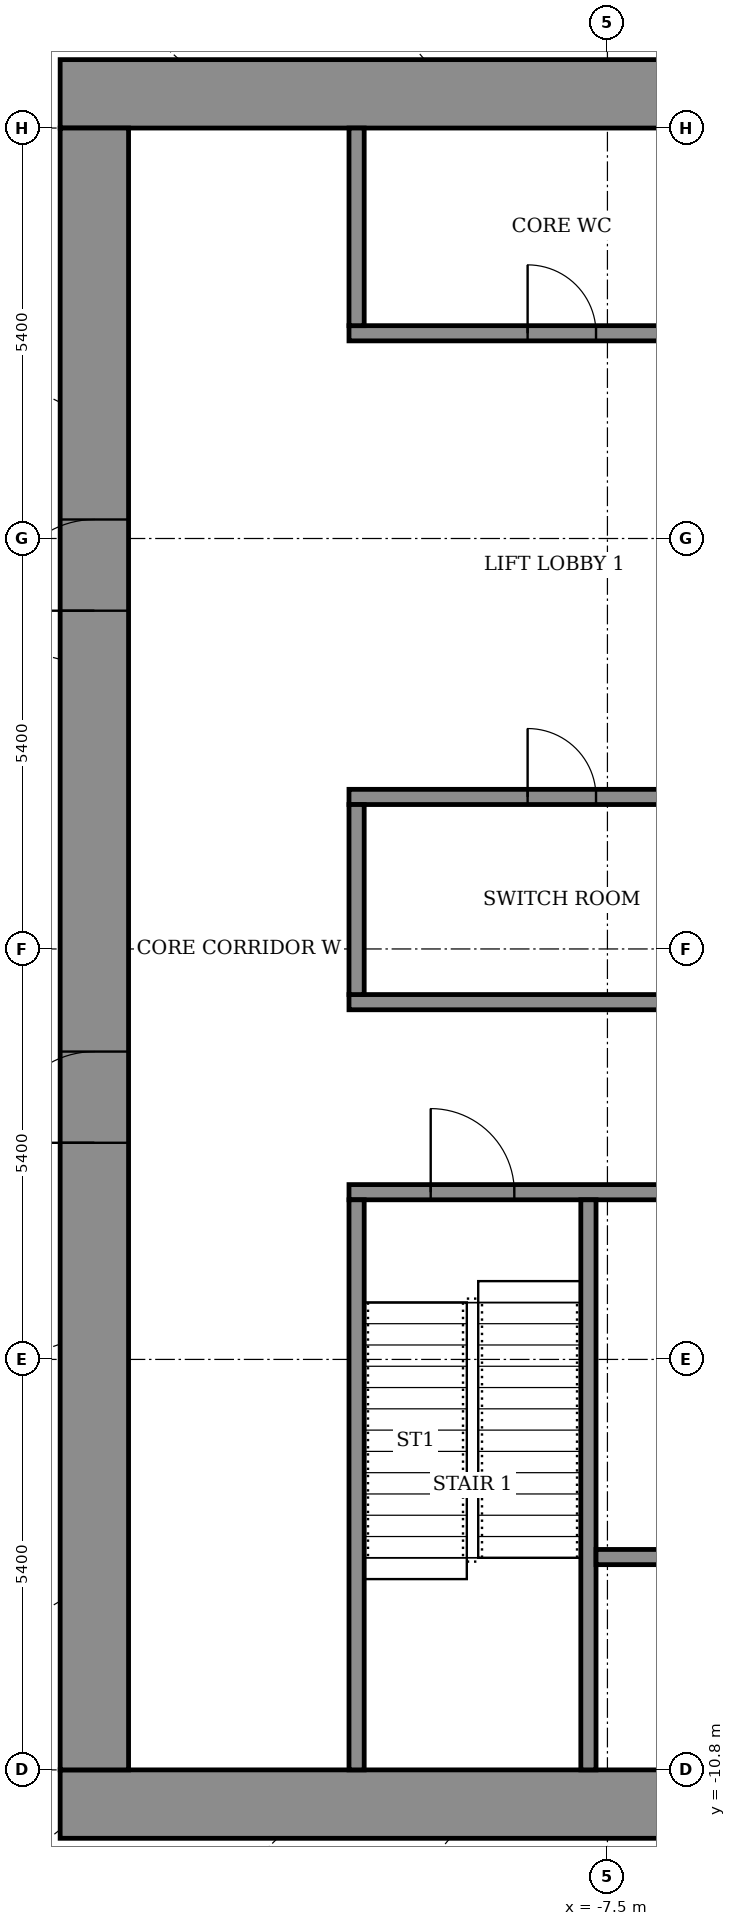
"""IFC4 building model, lengths in metres.
Left out: names, types, materials, properties, quantities, classifications, styles, units other than length and angle.
Written with IfcOpenShell. Run it as: python <this file> out.ifc"""

import sys

from ifc_helpers import new_model, si_unit, direction, frame, frame_2d, origin, place, context, subcontext, project, spatial, rectangle, extrude, element, fill, save


model = new_model("IFC4")
c1 = context("Model", 3, precision=1e-05, world=origin(), true_north=direction((0.0, 1.0)))
c2 = subcontext(c1, "Body", "Model", "MODEL_VIEW")
j1 = project(units=[si_unit("LENGTHUNIT", "METRE"), si_unit("PLANEANGLEUNIT", "RADIAN")], contexts=[c1])
p1 = place(None, origin())
s1 = spatial("IfcSite", under=j1, at=p1, CompositionType="ELEMENT")
p2 = place(p1, origin())
s2 = spatial("IfcBuilding", under=s1, at=p2, CompositionType="ELEMENT")
p3 = place(p2, frame((0.0, 0.0, 148.1)))
s3 = spatial("IfcBuildingStorey", under=s2, at=p3, CompositionType="ELEMENT", Elevation=148.1)
for number, where, z_axis, x_axis in (
    (1, (-14.7, -11.25, 0.0), (0.0, 0.0, 1.0), (1.0, 0.0, 0.0)),
    (2, (-14.7, 11.25, 0.0), (0.0, 0.0, 1.0), (1.0, 0.0, 0.0)),
):
    element("IfcWall", number, at=place(p3, frame(where, z_axis=z_axis, x_axis=x_axis)), inside=s3, PredefinedType="SHEAR", context=c2, shape_type="SweptSolid", body=[
        extrude(rectangle(XDim=29.4, YDim=0.9, at=frame_2d((14.7, 0.0))), origin(), (0.0, 0.0, 1.0), 4.6),
    ])
p4 = place(p3, frame((-14.25, -10.8, 0.0), z_axis=(0.0, 0.0, 1.0), x_axis=(0.0, 1.0, 0.0)))
e3 = element("IfcWall", 3, at=p4, inside=s3, PredefinedType="SHEAR", context=c2, shape_type="SweptSolid", body=[
    extrude(rectangle(XDim=21.6, YDim=0.9, at=frame_2d((10.8, 0.0))), origin(), (0.0, 0.0, 1.0), 4.6),
])
p5 = place(p4, frame((8.25, 0.0, 0.0)))
e4 = element("IfcOpeningElement", 4, at=p5, cuts=e3, PredefinedType="OPENING", context=c2, shape_type="SweptSolid", body=[
    extrude(rectangle(XDim=1.2, YDim=2.1, at=frame_2d((0.6, 1.05))), frame((0.0, 0.46, 0.0), z_axis=(0.0, -1.0, 0.0), x_axis=(1.0, 0.0, 0.0)), (0.0, 0.0, 1.0), 0.92),
])
p6 = place(p4, frame((15.25, 0.0, 0.0)))
e5 = element("IfcOpeningElement", 5, at=p6, cuts=e3, PredefinedType="OPENING", context=c2, shape_type="SweptSolid", body=[
    extrude(rectangle(XDim=1.2, YDim=2.1, at=frame_2d((0.6, 1.05))), frame((0.0, 0.46, 0.0), z_axis=(0.0, -1.0, 0.0), x_axis=(1.0, 0.0, 0.0)), (0.0, 0.0, 1.0), 0.92),
])
p7 = place(p3, frame((-10.9, -3.2, 0.0), z_axis=(0.0, 0.0, 1.0), x_axis=(1.0, 0.0, 0.0)))
e6 = element("IfcWall", 6, at=p7, inside=s3, PredefinedType="SHEAR", context=c2, shape_type="SweptSolid", body=[
    extrude(rectangle(XDim=21.8, YDim=0.2, at=frame_2d((10.9, 0.0))), origin(), (0.0, 0.0, 1.0), 4.05),
])
p8 = place(p7, frame((1.075, 0.0, 0.0)))
e7 = element("IfcOpeningElement", 7, at=p8, cuts=e6, PredefinedType="OPENING", context=c2, shape_type="SweptSolid", body=[
    extrude(rectangle(XDim=1.1, YDim=2.1, at=frame_2d((0.55, 1.05))), frame((0.0, 0.11, 0.0), z_axis=(0.0, -1.0, 0.0), x_axis=(1.0, 0.0, 0.0)), (0.0, 0.0, 1.0), 0.22),
])
p9 = place(p7, frame((10.325, 0.0, 0.0)))
e8 = element("IfcOpeningElement", 8, at=p9, cuts=e6, PredefinedType="OPENING", context=c2, shape_type="SweptSolid", body=[
    extrude(rectangle(XDim=1.1, YDim=2.1, at=frame_2d((0.55, 1.05))), frame((0.0, 0.11, 0.0), z_axis=(0.0, -1.0, 0.0), x_axis=(1.0, 0.0, 0.0)), (0.0, 0.0, 1.0), 0.22),
])
p10 = place(p7, frame((19.625, 0.0, 0.0)))
e9 = element("IfcOpeningElement", 9, at=p10, cuts=e6, PredefinedType="OPENING", context=c2, shape_type="SweptSolid", body=[
    extrude(rectangle(XDim=1.1, YDim=2.1, at=frame_2d((0.55, 1.05))), frame((0.0, 0.11, 0.0), z_axis=(0.0, -1.0, 0.0), x_axis=(1.0, 0.0, 0.0)), (0.0, 0.0, 1.0), 0.22),
])
p11 = place(p7, frame((5.7, 0.0, 0.0)))
e10 = element("IfcOpeningElement", 10, at=p11, cuts=e6, PredefinedType="OPENING", context=c2, shape_type="SweptSolid", body=[
    extrude(rectangle(XDim=1.1, YDim=2.1, at=frame_2d((0.55, 1.05))), frame((0.0, 0.11, 0.0), z_axis=(0.0, -1.0, 0.0), x_axis=(1.0, 0.0, 0.0)), (0.0, 0.0, 1.0), 0.22),
])
p12 = place(p7, frame((14.975, 0.0, 0.0)))
e11 = element("IfcOpeningElement", 11, at=p12, cuts=e6, PredefinedType="OPENING", context=c2, shape_type="SweptSolid", body=[
    extrude(rectangle(XDim=1.1, YDim=2.1, at=frame_2d((0.55, 1.05))), frame((0.0, 0.11, 0.0), z_axis=(0.0, -1.0, 0.0), x_axis=(1.0, 0.0, 0.0)), (0.0, 0.0, 1.0), 0.22),
])
p13 = place(p3, frame((-10.9, -0.7, 0.0), z_axis=(0.0, 0.0, 1.0), x_axis=(1.0, 0.0, 0.0)))
e12 = element("IfcWall", 12, at=p13, inside=s3, PredefinedType="SHEAR", context=c2, shape_type="SweptSolid", body=[
    extrude(rectangle(XDim=21.8, YDim=0.2, at=frame_2d((10.9, 0.0))), origin(), (0.0, 0.0, 1.0), 4.05),
])
p14 = place(p3, frame((-10.9, 2.0, 0.0), z_axis=(0.0, 0.0, 1.0), x_axis=(1.0, 0.0, 0.0)))
e13 = element("IfcWall", 13, at=p14, inside=s3, PredefinedType="SHEAR", context=c2, shape_type="SweptSolid", body=[
    extrude(rectangle(XDim=21.8, YDim=0.2, at=frame_2d((10.9, 0.0))), origin(), (0.0, 0.0, 1.0), 4.05),
])
p15 = place(p14, frame((14.4, 0.0, 0.0)))
e14 = element("IfcOpeningElement", 14, at=p15, cuts=e13, PredefinedType="OPENING", context=c2, shape_type="SweptSolid", body=[
    extrude(rectangle(XDim=1.1, YDim=2.1, at=frame_2d((0.55, 1.05))), frame((0.0, 0.11, 0.0), z_axis=(0.0, -1.0, 0.0), x_axis=(1.0, 0.0, 0.0)), (0.0, 0.0, 1.0), 0.22),
])
p16 = place(p14, frame((17.1, 0.0, 0.0)))
e15 = element("IfcOpeningElement", 15, at=p16, cuts=e13, PredefinedType="OPENING", context=c2, shape_type="SweptSolid", body=[
    extrude(rectangle(XDim=1.1, YDim=2.1, at=frame_2d((0.55, 1.05))), frame((0.0, 0.11, 0.0), z_axis=(0.0, -1.0, 0.0), x_axis=(1.0, 0.0, 0.0)), (0.0, 0.0, 1.0), 0.22),
])
p17 = place(p14, frame((19.8, 0.0, 0.0)))
e16 = element("IfcOpeningElement", 16, at=p17, cuts=e13, PredefinedType="OPENING", context=c2, shape_type="SweptSolid", body=[
    extrude(rectangle(XDim=1.1, YDim=2.1, at=frame_2d((0.55, 1.05))), frame((0.0, 0.11, 0.0), z_axis=(0.0, -1.0, 0.0), x_axis=(1.0, 0.0, 0.0)), (0.0, 0.0, 1.0), 0.22),
])
p18 = place(p14, frame((2.35, 0.0, 0.0)))
e17 = element("IfcOpeningElement", 17, at=p18, cuts=e13, PredefinedType="OPENING", context=c2, shape_type="SweptSolid", body=[
    extrude(rectangle(XDim=0.9, YDim=2.1, at=frame_2d((0.45, 1.05))), frame((0.0, 0.11, 0.0), z_axis=(0.0, -1.0, 0.0), x_axis=(1.0, 0.0, 0.0)), (0.0, 0.0, 1.0), 0.22),
])
p19 = place(p14, frame((9.1, 0.0, 0.0)))
e18 = element("IfcOpeningElement", 18, at=p19, cuts=e13, PredefinedType="OPENING", context=c2, shape_type="SweptSolid", body=[
    extrude(rectangle(XDim=0.9, YDim=2.1, at=frame_2d((0.45, 1.05))), frame((0.0, 0.11, 0.0), z_axis=(0.0, -1.0, 0.0), x_axis=(1.0, 0.0, 0.0)), (0.0, 0.0, 1.0), 0.22),
])
p20 = place(p3, frame((-10.9, 8.1, 0.0), z_axis=(0.0, 0.0, 1.0), x_axis=(1.0, 0.0, 0.0)))
e19 = element("IfcWall", 19, at=p20, inside=s3, PredefinedType="SHEAR", context=c2, shape_type="SweptSolid", body=[
    extrude(rectangle(XDim=21.8, YDim=0.2, at=frame_2d((10.9, 0.0))), origin(), (0.0, 0.0, 1.0), 4.05),
])
p21 = place(p20, frame((14.4, 0.0, 0.0)))
e20 = element("IfcOpeningElement", 20, at=p21, cuts=e19, PredefinedType="OPENING", context=c2, shape_type="SweptSolid", body=[
    extrude(rectangle(XDim=1.1, YDim=2.1, at=frame_2d((0.55, 1.05))), frame((0.0, 0.11, 0.0), z_axis=(0.0, -1.0, 0.0), x_axis=(1.0, 0.0, 0.0)), (0.0, 0.0, 1.0), 0.22),
])
p22 = place(p20, frame((17.1, 0.0, 0.0)))
e21 = element("IfcOpeningElement", 21, at=p22, cuts=e19, PredefinedType="OPENING", context=c2, shape_type="SweptSolid", body=[
    extrude(rectangle(XDim=1.1, YDim=2.1, at=frame_2d((0.55, 1.05))), frame((0.0, 0.11, 0.0), z_axis=(0.0, -1.0, 0.0), x_axis=(1.0, 0.0, 0.0)), (0.0, 0.0, 1.0), 0.22),
])
p23 = place(p20, frame((19.8, 0.0, 0.0)))
e22 = element("IfcOpeningElement", 22, at=p23, cuts=e19, PredefinedType="OPENING", context=c2, shape_type="SweptSolid", body=[
    extrude(rectangle(XDim=1.1, YDim=2.1, at=frame_2d((0.55, 1.05))), frame((0.0, 0.11, 0.0), z_axis=(0.0, -1.0, 0.0), x_axis=(1.0, 0.0, 0.0)), (0.0, 0.0, 1.0), 0.22),
])
p24 = place(p20, frame((2.35, 0.0, 0.0)))
e23 = element("IfcOpeningElement", 23, at=p24, cuts=e19, PredefinedType="OPENING", context=c2, shape_type="SweptSolid", body=[
    extrude(rectangle(XDim=0.9, YDim=2.1, at=frame_2d((0.45, 1.05))), frame((0.0, 0.11, 0.0), z_axis=(0.0, -1.0, 0.0), x_axis=(1.0, 0.0, 0.0)), (0.0, 0.0, 1.0), 0.22),
])
p25 = place(p20, frame((9.1, 0.0, 0.0)))
e24 = element("IfcOpeningElement", 24, at=p25, cuts=e19, PredefinedType="OPENING", context=c2, shape_type="SweptSolid", body=[
    extrude(rectangle(XDim=0.9, YDim=2.1, at=frame_2d((0.45, 1.05))), frame((0.0, 0.11, 0.0), z_axis=(0.0, -1.0, 0.0), x_axis=(1.0, 0.0, 0.0)), (0.0, 0.0, 1.0), 0.22),
])
for number, where, z_axis, x_axis in (
    (25, (-10.8, -10.8, 0.0), (0.0, 0.0, 1.0), (0.0, 1.0, 0.0)),
    (26, (-7.75, -10.8, 0.0), (0.0, 0.0, 1.0), (0.0, 1.0, 0.0)),
):
    element("IfcWall", number, at=place(p3, frame(where, z_axis=z_axis, x_axis=x_axis)), inside=s3, PredefinedType="SHEAR", context=c2, shape_type="SweptSolid", body=[
        extrude(rectangle(XDim=7.5, YDim=0.2, at=frame_2d((3.75, 0.0))), origin(), (0.0, 0.0, 1.0), 4.05),
    ])
p26 = place(p3, frame((-7.65, -8.0, 0.0), z_axis=(0.0, 0.0, 1.0), x_axis=(1.0, 0.0, 0.0)))
e27 = element("IfcWall", 27, at=p26, inside=s3, PredefinedType="SHEAR", context=c2, shape_type="SweptSolid", body=[
    extrude(rectangle(XDim=6.0, YDim=0.2, at=frame_2d((3.0, 0.0))), origin(), (0.0, 0.0, 1.0), 4.05),
])
p27 = place(p26, frame((0.9, 0.0, 0.0)))
e28 = element("IfcOpeningElement", 28, at=p27, cuts=e27, PredefinedType="OPENING", context=c2, shape_type="SweptSolid", body=[
    extrude(rectangle(XDim=1.1, YDim=2.1, at=frame_2d((0.55, 1.05))), frame((0.0, 0.11, 0.0), z_axis=(0.0, -1.0, 0.0), x_axis=(1.0, 0.0, 0.0)), (0.0, 0.0, 1.0), 0.22),
])
p28 = place(p26, frame((4.0, 0.0, 0.0)))
e29 = element("IfcOpeningElement", 29, at=p28, cuts=e27, PredefinedType="OPENING", context=c2, shape_type="SweptSolid", body=[
    extrude(rectangle(XDim=1.1, YDim=2.1, at=frame_2d((0.55, 1.05))), frame((0.0, 0.11, 0.0), z_axis=(0.0, -1.0, 0.0), x_axis=(1.0, 0.0, 0.0)), (0.0, 0.0, 1.0), 0.22),
])
p29 = place(p3, frame((-10.8, -0.6, 0.0), z_axis=(0.0, 0.0, 1.0), x_axis=(0.0, 1.0, 0.0)))
e30 = element("IfcWall", 30, at=p29, inside=s3, PredefinedType="STANDARD", context=c2, shape_type="SweptSolid", body=[
    extrude(rectangle(XDim=2.5, YDim=0.2, at=frame_2d((1.25, 0.0))), origin(), (0.0, 0.0, 1.0), 4.05),
])
p30 = place(p3, frame((-10.8, 8.2, 0.0), z_axis=(0.0, 0.0, 1.0), x_axis=(0.0, 1.0, 0.0)))
e31 = element("IfcWall", 31, at=p30, inside=s3, PredefinedType="STANDARD", context=c2, shape_type="SweptSolid", body=[
    extrude(rectangle(XDim=2.6, YDim=0.2, at=frame_2d((1.3, 0.0))), origin(), (0.0, 0.0, 1.0), 4.05),
])
p31 = place(p5, origin())
e32 = element("IfcDoor", 32, at=p31, inside=s3, OperationType="DOUBLE_DOOR_SINGLE_SWING", PredefinedType="DOOR", context=c2, shape_type="SweptSolid", body=[
    extrude(rectangle(XDim=1.2, YDim=2.1, at=frame_2d((0.6, 1.05))), frame((0.0, 0.025, 0.0), z_axis=(0.0, -1.0, 0.0), x_axis=(1.0, 0.0, 0.0)), (0.0, 0.0, 1.0), 0.05),
])
fill(e4, e32)
p32 = place(p6, origin())
e33 = element("IfcDoor", 33, at=p32, inside=s3, OperationType="DOUBLE_DOOR_SINGLE_SWING", PredefinedType="DOOR", context=c2, shape_type="SweptSolid", body=[
    extrude(rectangle(XDim=1.2, YDim=2.1, at=frame_2d((0.6, 1.05))), frame((0.0, 0.025, 0.0), z_axis=(0.0, -1.0, 0.0), x_axis=(1.0, 0.0, 0.0)), (0.0, 0.0, 1.0), 0.05),
])
fill(e5, e33)
p33 = place(p18, origin())
e34 = element("IfcDoor", 34, at=p33, inside=s3, OperationType="SINGLE_SWING_LEFT", PredefinedType="DOOR", context=c2, shape_type="SweptSolid", body=[
    extrude(rectangle(XDim=0.9, YDim=2.1, at=frame_2d((0.45, 1.05))), frame((0.0, 0.025, 0.0), z_axis=(0.0, -1.0, 0.0), x_axis=(1.0, 0.0, 0.0)), (0.0, 0.0, 1.0), 0.05),
])
fill(e17, e34)
p34 = place(p24, origin())
e35 = element("IfcDoor", 35, at=p34, inside=s3, OperationType="SINGLE_SWING_RIGHT", PredefinedType="DOOR", context=c2, shape_type="SweptSolid", body=[
    extrude(rectangle(XDim=0.9, YDim=2.1, at=frame_2d((0.45, 1.05))), frame((0.0, 0.025, 0.0), z_axis=(0.0, -1.0, 0.0), x_axis=(1.0, 0.0, 0.0)), (0.0, 0.0, 1.0), 0.05),
])
fill(e23, e35)
p35 = place(p8, origin())
e36 = element("IfcDoor", 36, at=p35, inside=s3, OperationType="SINGLE_SWING_RIGHT", PredefinedType="DOOR", context=c2, shape_type="SweptSolid", body=[
    extrude(rectangle(XDim=1.1, YDim=2.1, at=frame_2d((0.55, 1.05))), frame((0.0, 0.025, 0.0), z_axis=(0.0, -1.0, 0.0), x_axis=(1.0, 0.0, 0.0)), (0.0, 0.0, 1.0), 0.05),
])
fill(e7, e36)
save(model, sys.argv[1])
